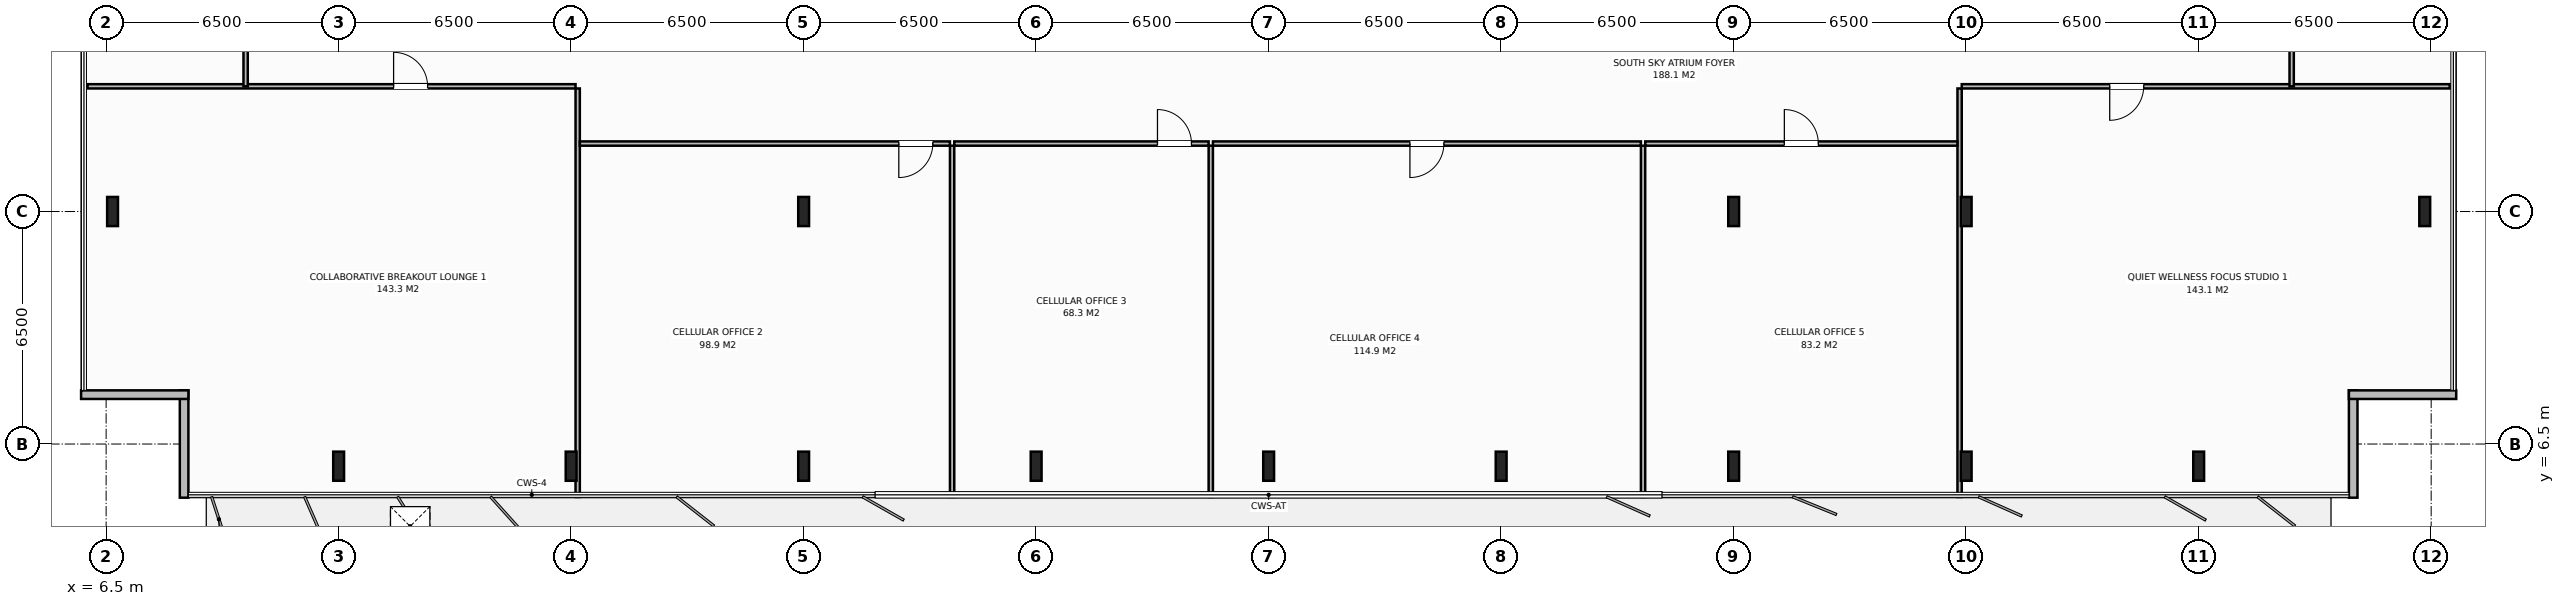
"""IFC4 building model, lengths in metres.
Left out: names, types, materials, properties, quantities, classifications, styles, units other than length and angle.
Written with IfcOpenShell. Run it as: python <this file> out.ifc"""

import sys

from ifc_helpers import new_model, si_unit, direction, frame, frame_2d, origin, origin_2d, place, context, subcontext, project, spatial, rectangle, i_section, extrude, element, fill, save


model = new_model("IFC4")
c1 = context("Model", 3, precision=1e-05, world=origin(), true_north=direction((0.0, 1.0)))
c2 = subcontext(c1, "Body", "Model", "MODEL_VIEW")
j1 = project(units=[si_unit("LENGTHUNIT", "METRE"), si_unit("PLANEANGLEUNIT", "RADIAN")], contexts=[c1])
p1 = place(None, origin())
s1 = spatial("IfcSite", under=j1, at=p1, CompositionType="ELEMENT")
p2 = place(p1, origin())
s2 = spatial("IfcBuilding", under=s1, at=p2, CompositionType="ELEMENT")
p3 = place(p2, frame((0.0, 0.0, 202.4)))
s3 = spatial("IfcBuildingStorey", under=s2, at=p3, CompositionType="ELEMENT", Elevation=202.4)
for number, where, z_axis, x_axis in (
    (1, (58.5, 13.0, 0.0), (0.0, 0.0, 1.0), (1.0, 0.0, 0.0)),
    (2, (26.0, 13.0, 0.0), (0.0, 0.0, 1.0), (1.0, 0.0, 0.0)),
    (3, (52.0, 13.0, 0.0), (0.0, 0.0, 1.0), (1.0, 0.0, 0.0)),
    (4, (13.0, 5.88, 0.0), (0.0, 0.0, 1.0), (1.0, 0.0, 0.0)),
    (5, (19.5, 5.88, 0.0), (0.0, 0.0, 1.0), (1.0, 0.0, 0.0)),
    (6, (26.0, 5.88, 0.0), (0.0, 0.0, 1.0), (1.0, 0.0, 0.0)),
    (7, (32.5, 5.88, 0.0), (0.0, 0.0, 1.0), (1.0, 0.0, 0.0)),
    (8, (39.0, 5.88, 0.0), (0.0, 0.0, 1.0), (1.0, 0.0, 0.0)),
    (9, (45.5, 5.88, 0.0), (0.0, 0.0, 1.0), (1.0, 0.0, 0.0)),
    (10, (52.0, 5.88, 0.0), (0.0, 0.0, 1.0), (1.0, 0.0, 0.0)),
    (11, (58.5, 5.88, 0.0), (0.0, 0.0, 1.0), (1.0, 0.0, 0.0)),
    (12, (65.0, 5.88, 0.0), (0.0, 0.0, 1.0), (1.0, 0.0, 0.0)),
    (13, (6.68, 13.0, 0.0), (0.0, 0.0, 1.0), (1.0, 0.0, 0.0)),
    (14, (71.32, 13.0, 0.0), (0.0, 0.0, 1.0), (1.0, 0.0, 0.0)),
):
    element("IfcColumn", number, at=place(p3, frame(where, z_axis=z_axis, x_axis=x_axis)), inside=s3, PredefinedType="COLUMN", context=c2, shape_type="SweptSolid", body=[
        extrude(i_section(OverallWidth=0.303, OverallDepth=0.814, WebThickness=0.021, FlangeThickness=0.04, at=origin_2d()), origin(), (0.0, 0.0, 1.0), 3.8),
    ])
for number, where, z_axis, x_axis in (
    (15, (8.68, 5.0, 0.0), (0.0, 0.0, 1.0), (0.0, 1.0, 0.0)),
    (16, (8.8, 7.88, 0.0), (0.0, 0.0, 1.0), (-1.0, 0.0, 0.0)),
    (17, (69.32, 8.0, 0.0), (0.0, 0.0, 1.0), (0.0, -1.0, 0.0)),
    (18, (72.2, 7.88, 0.0), (0.0, 0.0, 1.0), (-1.0, 0.0, 0.0)),
):
    element("IfcWall", number, at=place(p3, frame(where, z_axis=z_axis, x_axis=x_axis)), inside=s3, PredefinedType="STANDARD", context=c2, shape_type="SweptSolid", body=[
        extrude(rectangle(XDim=3.0, YDim=0.24, at=frame_2d((1.5, 0.0))), origin(), (0.0, 0.0, 1.0), 3.58),
    ])
p4 = place(p3, frame((19.683, 5.02, 0.0), z_axis=(0.0, 0.0, 1.0), x_axis=(0.0, 1.0, 0.0)))
e19 = element("IfcWall", 19, at=p4, inside=s3, PredefinedType="PARTITIONING", context=c2, shape_type="SweptSolid", body=[
    extrude(rectangle(XDim=11.42, YDim=0.12, at=frame_2d((5.71, 0.0))), origin(), (0.0, 0.0, 1.0), 2.88),
])
p5 = place(p3, frame((5.98, 16.5, 0.0), z_axis=(0.0, 0.0, 1.0), x_axis=(1.0, 0.0, 0.0)))
e20 = element("IfcWall", 20, at=p5, inside=s3, PredefinedType="PARTITIONING", context=c2, shape_type="SweptSolid", body=[
    extrude(rectangle(XDim=13.643, YDim=0.12, at=frame_2d((6.822, 0.0))), origin(), (0.0, 0.0, 1.0), 3.58),
])
p6 = place(p5, frame((8.557, 0.0, 0.0)))
e21 = element("IfcOpeningElement", 21, at=p6, cuts=e20, PredefinedType="OPENING", context=c2, shape_type="SweptSolid", body=[
    extrude(rectangle(XDim=0.95, YDim=2.15, at=frame_2d((0.475, 1.075))), frame((0.0, 0.07, 0.0), z_axis=(0.0, -1.0, 0.0), x_axis=(1.0, 0.0, 0.0)), (0.0, 0.0, 1.0), 0.14),
])
p7 = place(p3, frame((30.151, 5.02, 0.0), z_axis=(0.0, 0.0, 1.0), x_axis=(0.0, 1.0, 0.0)))
e22 = element("IfcWall", 22, at=p7, inside=s3, PredefinedType="PARTITIONING", context=c2, shape_type="SweptSolid", body=[
    extrude(rectangle(XDim=9.82, YDim=0.12, at=frame_2d((4.91, 0.0))), origin(), (0.0, 0.0, 1.0), 3.58),
])
p8 = place(p3, frame((19.743, 14.9, 0.0), z_axis=(0.0, 0.0, 1.0), x_axis=(1.0, 0.0, 0.0)))
e23 = element("IfcWall", 23, at=p8, inside=s3, PredefinedType="PARTITIONING", context=c2, shape_type="SweptSolid", body=[
    extrude(rectangle(XDim=10.347, YDim=0.12, at=frame_2d((5.174, 0.0))), origin(), (0.0, 0.0, 1.0), 3.58),
])
p9 = place(p8, frame((8.917, 0.0, 0.0)))
e24 = element("IfcOpeningElement", 24, at=p9, cuts=e23, PredefinedType="OPENING", context=c2, shape_type="SweptSolid", body=[
    extrude(rectangle(XDim=0.95, YDim=2.15, at=frame_2d((0.475, 1.075))), frame((0.0, 0.07, 0.0), z_axis=(0.0, -1.0, 0.0), x_axis=(1.0, 0.0, 0.0)), (0.0, 0.0, 1.0), 0.14),
])
p10 = place(p3, frame((37.382, 5.02, 0.0), z_axis=(0.0, 0.0, 1.0), x_axis=(0.0, 1.0, 0.0)))
e25 = element("IfcWall", 25, at=p10, inside=s3, PredefinedType="PARTITIONING", context=c2, shape_type="SweptSolid", body=[
    extrude(rectangle(XDim=9.82, YDim=0.12, at=frame_2d((4.91, 0.0))), origin(), (0.0, 0.0, 1.0), 3.58),
])
p11 = place(p3, frame((30.211, 14.9, 0.0), z_axis=(0.0, 0.0, 1.0), x_axis=(1.0, 0.0, 0.0)))
e26 = element("IfcWall", 26, at=p11, inside=s3, PredefinedType="PARTITIONING", context=c2, shape_type="SweptSolid", body=[
    extrude(rectangle(XDim=7.111, YDim=0.12, at=frame_2d((3.556, 0.0))), origin(), (0.0, 0.0, 1.0), 3.58),
])
p12 = place(p11, frame((5.681, 0.0, 0.0)))
e27 = element("IfcOpeningElement", 27, at=p12, cuts=e26, PredefinedType="OPENING", context=c2, shape_type="SweptSolid", body=[
    extrude(rectangle(XDim=0.95, YDim=2.15, at=frame_2d((0.475, 1.075))), frame((0.0, 0.07, 0.0), z_axis=(0.0, -1.0, 0.0), x_axis=(1.0, 0.0, 0.0)), (0.0, 0.0, 1.0), 0.14),
])
p13 = place(p3, frame((49.467, 5.02, 0.0), z_axis=(0.0, 0.0, 1.0), x_axis=(0.0, 1.0, 0.0)))
e28 = element("IfcWall", 28, at=p13, inside=s3, PredefinedType="PARTITIONING", context=c2, shape_type="SweptSolid", body=[
    extrude(rectangle(XDim=9.82, YDim=0.12, at=frame_2d((4.91, 0.0))), origin(), (0.0, 0.0, 1.0), 3.58),
])
p14 = place(p3, frame((37.442, 14.9, 0.0), z_axis=(0.0, 0.0, 1.0), x_axis=(1.0, 0.0, 0.0)))
e29 = element("IfcWall", 29, at=p14, inside=s3, PredefinedType="PARTITIONING", context=c2, shape_type="SweptSolid", body=[
    extrude(rectangle(XDim=11.965, YDim=0.12, at=frame_2d((5.983, 0.0))), origin(), (0.0, 0.0, 1.0), 3.58),
])
p15 = place(p14, frame((5.508, 0.0, 0.0)))
e30 = element("IfcOpeningElement", 30, at=p15, cuts=e29, PredefinedType="OPENING", context=c2, shape_type="SweptSolid", body=[
    extrude(rectangle(XDim=0.95, YDim=2.15, at=frame_2d((0.475, 1.075))), frame((0.0, 0.07, 0.0), z_axis=(0.0, -1.0, 0.0), x_axis=(1.0, 0.0, 0.0)), (0.0, 0.0, 1.0), 0.14),
])
p16 = place(p3, frame((58.317, 5.02, 0.0), z_axis=(0.0, 0.0, 1.0), x_axis=(0.0, 1.0, 0.0)))
e31 = element("IfcWall", 31, at=p16, inside=s3, PredefinedType="PARTITIONING", context=c2, shape_type="SweptSolid", body=[
    extrude(rectangle(XDim=11.42, YDim=0.12, at=frame_2d((5.71, 0.0))), origin(), (0.0, 0.0, 1.0), 2.88),
])
p17 = place(p3, frame((49.527, 14.9, 0.0), z_axis=(0.0, 0.0, 1.0), x_axis=(1.0, 0.0, 0.0)))
e32 = element("IfcWall", 32, at=p17, inside=s3, PredefinedType="PARTITIONING", context=c2, shape_type="SweptSolid", body=[
    extrude(rectangle(XDim=8.729, YDim=0.12, at=frame_2d((4.365, 0.0))), origin(), (0.0, 0.0, 1.0), 3.58),
])
p18 = place(p17, frame((3.89, 0.0, 0.0)))
e33 = element("IfcOpeningElement", 33, at=p18, cuts=e32, PredefinedType="OPENING", context=c2, shape_type="SweptSolid", body=[
    extrude(rectangle(XDim=0.95, YDim=2.15, at=frame_2d((0.475, 1.075))), frame((0.0, 0.07, 0.0), z_axis=(0.0, -1.0, 0.0), x_axis=(1.0, 0.0, 0.0)), (0.0, 0.0, 1.0), 0.14),
])
p19 = place(p3, frame((58.377, 16.5, 0.0), z_axis=(0.0, 0.0, 1.0), x_axis=(1.0, 0.0, 0.0)))
e34 = element("IfcWall", 34, at=p19, inside=s3, PredefinedType="PARTITIONING", context=c2, shape_type="SweptSolid", body=[
    extrude(rectangle(XDim=13.643, YDim=0.12, at=frame_2d((6.822, 0.0))), origin(), (0.0, 0.0, 1.0), 3.58),
])
p20 = place(p19, frame((4.137, 0.0, 0.0)))
e35 = element("IfcOpeningElement", 35, at=p20, cuts=e34, PredefinedType="OPENING", context=c2, shape_type="SweptSolid", body=[
    extrude(rectangle(XDim=0.95, YDim=2.15, at=frame_2d((0.475, 1.075))), frame((0.0, 0.07, 0.0), z_axis=(0.0, -1.0, 0.0), x_axis=(1.0, 0.0, 0.0)), (0.0, 0.0, 1.0), 0.14),
])
p21 = place(p3, frame((10.4, 16.5, 0.0), z_axis=(0.0, 0.0, 1.0), x_axis=(0.0, 1.0, 0.0)))
e36 = element("IfcWall", 36, at=p21, inside=s3, PredefinedType="PARTITIONING", context=c2, shape_type="SweptSolid", body=[
    extrude(rectangle(XDim=19.0, YDim=0.12, at=frame_2d((9.5, 0.0))), origin(), (0.0, 0.0, 1.0), 3.58),
])
p22 = place(p21, frame((9.025, 0.0, 0.0)))
e37 = element("IfcOpeningElement", 37, at=p22, cuts=e36, PredefinedType="OPENING", context=c2, shape_type="SweptSolid", body=[
    extrude(rectangle(XDim=0.95, YDim=2.15, at=frame_2d((0.475, 1.075))), frame((0.0, 0.07, 0.0), z_axis=(0.0, -1.0, 0.0), x_axis=(1.0, 0.0, 0.0)), (0.0, 0.0, 1.0), 0.14),
])
p23 = place(p3, frame((67.6, 16.5, 0.0), z_axis=(0.0, 0.0, 1.0), x_axis=(0.0, 1.0, 0.0)))
e38 = element("IfcWall", 38, at=p23, inside=s3, PredefinedType="PARTITIONING", context=c2, shape_type="SweptSolid", body=[
    extrude(rectangle(XDim=9.5, YDim=0.12, at=frame_2d((4.75, 0.0))), origin(), (0.0, 0.0, 1.0), 3.58),
])
p24 = place(p23, frame((5.325, 0.0, 0.0)))
e39 = element("IfcOpeningElement", 39, at=p24, cuts=e38, PredefinedType="OPENING", context=c2, shape_type="SweptSolid", body=[
    extrude(rectangle(XDim=0.95, YDim=2.15, at=frame_2d((0.475, 1.075))), frame((0.0, 0.07, 0.0), z_axis=(0.0, -1.0, 0.0), x_axis=(1.0, 0.0, 0.0)), (0.0, 0.0, 1.0), 0.14),
])
p25 = place(p3, frame((0.0, 0.0, -0.21)))
p26 = place(p25, frame((15.0, 4.2, 0.0)))
p27 = place(p26, frame((0.0, 0.0, 0.21)))
e40 = element("IfcDoor", 40, at=p27, inside=s3, OperationType="SINGLE_SWING_LEFT", PredefinedType="TRAPDOOR", context=c2, shape_type="SweptSolid", body=[
    extrude(rectangle(XDim=1.1, YDim=1.1, at=origin_2d()), origin(), (0.0, 0.0, 1.0), 0.05),
])
p28 = place(p6, origin())
e41 = element("IfcDoor", 41, at=p28, inside=s3, OperationType="SINGLE_SWING_LEFT", PredefinedType="DOOR", context=c2, shape_type="SweptSolid", body=[
    extrude(rectangle(XDim=0.95, YDim=2.15, at=frame_2d((0.475, 1.075))), frame((0.0, 0.025, 0.0), z_axis=(0.0, -1.0, 0.0), x_axis=(1.0, 0.0, 0.0)), (0.0, 0.0, 1.0), 0.05),
])
fill(e21, e41)
p29 = place(p9, origin())
e42 = element("IfcDoor", 42, at=p29, inside=s3, OperationType="SINGLE_SWING_RIGHT", PredefinedType="DOOR", context=c2, shape_type="SweptSolid", body=[
    extrude(rectangle(XDim=0.95, YDim=2.15, at=frame_2d((0.475, 1.075))), frame((0.0, 0.025, 0.0), z_axis=(0.0, -1.0, 0.0), x_axis=(1.0, 0.0, 0.0)), (0.0, 0.0, 1.0), 0.05),
])
fill(e24, e42)
p30 = place(p12, origin())
e43 = element("IfcDoor", 43, at=p30, inside=s3, OperationType="SINGLE_SWING_LEFT", PredefinedType="DOOR", context=c2, shape_type="SweptSolid", body=[
    extrude(rectangle(XDim=0.95, YDim=2.15, at=frame_2d((0.475, 1.075))), frame((0.0, 0.025, 0.0), z_axis=(0.0, -1.0, 0.0), x_axis=(1.0, 0.0, 0.0)), (0.0, 0.0, 1.0), 0.05),
])
fill(e27, e43)
p31 = place(p15, origin())
e44 = element("IfcDoor", 44, at=p31, inside=s3, OperationType="SINGLE_SWING_RIGHT", PredefinedType="DOOR", context=c2, shape_type="SweptSolid", body=[
    extrude(rectangle(XDim=0.95, YDim=2.15, at=frame_2d((0.475, 1.075))), frame((0.0, 0.025, 0.0), z_axis=(0.0, -1.0, 0.0), x_axis=(1.0, 0.0, 0.0)), (0.0, 0.0, 1.0), 0.05),
])
fill(e30, e44)
p32 = place(p18, origin())
e45 = element("IfcDoor", 45, at=p32, inside=s3, OperationType="SINGLE_SWING_LEFT", PredefinedType="DOOR", context=c2, shape_type="SweptSolid", body=[
    extrude(rectangle(XDim=0.95, YDim=2.15, at=frame_2d((0.475, 1.075))), frame((0.0, 0.025, 0.0), z_axis=(0.0, -1.0, 0.0), x_axis=(1.0, 0.0, 0.0)), (0.0, 0.0, 1.0), 0.05),
])
fill(e33, e45)
p33 = place(p20, origin())
e46 = element("IfcDoor", 46, at=p33, inside=s3, OperationType="SINGLE_SWING_RIGHT", PredefinedType="DOOR", context=c2, shape_type="SweptSolid", body=[
    extrude(rectangle(XDim=0.95, YDim=2.15, at=frame_2d((0.475, 1.075))), frame((0.0, 0.025, 0.0), z_axis=(0.0, -1.0, 0.0), x_axis=(1.0, 0.0, 0.0)), (0.0, 0.0, 1.0), 0.05),
])
fill(e35, e46)
save(model, sys.argv[1])
